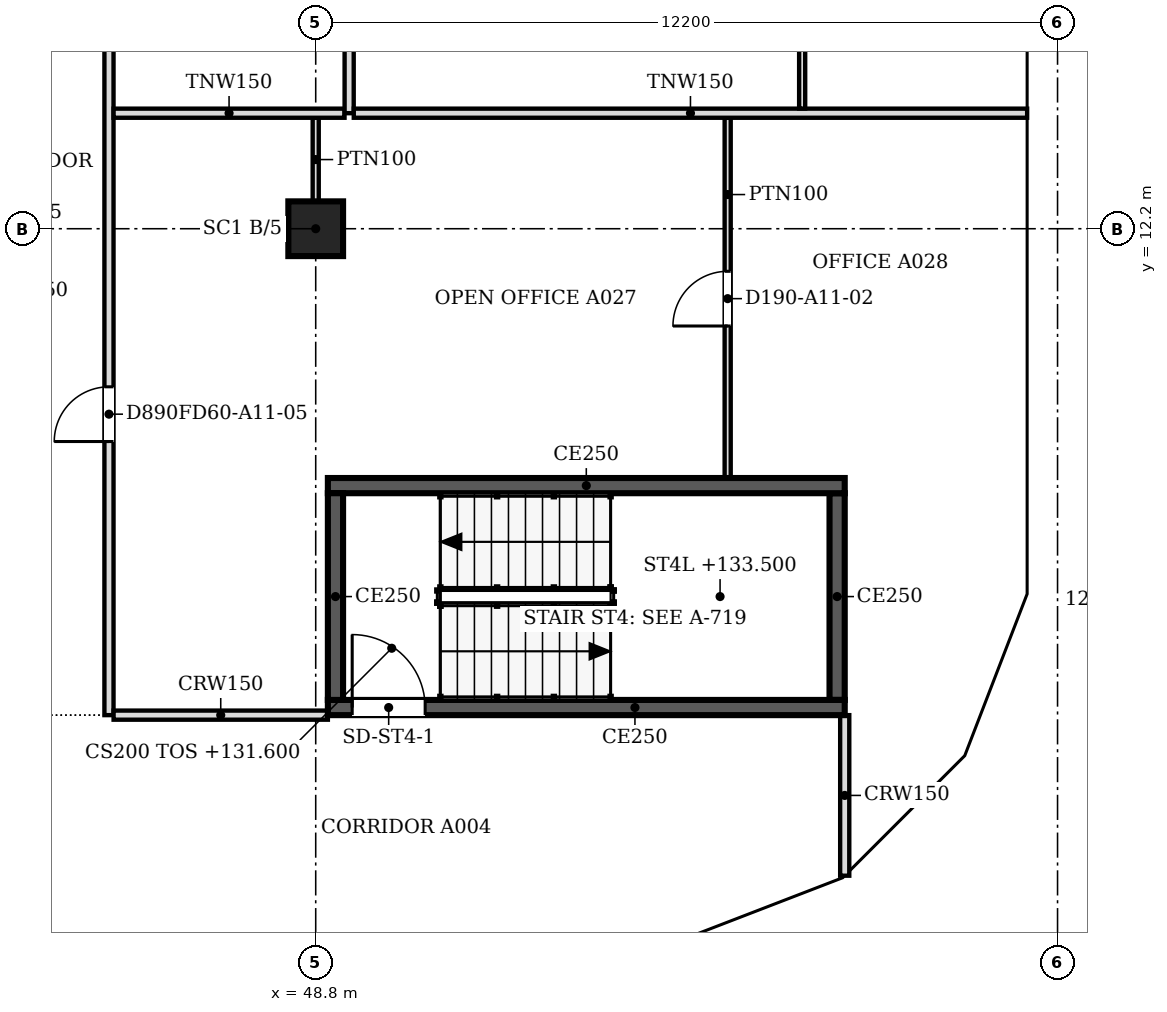
"""IFC4 building model, lengths in metres.
Left out: names, types, materials, properties, quantities, classifications, styles, units other than length and angle.
Written with IfcOpenShell. Run it as: python <this file> out.ifc"""

import sys

from ifc_helpers import new_model, si_unit, direction, frame, frame_2d, origin, origin_2d, place, context, subcontext, project, spatial, polyline, rectangle, outline, extrude, faceted_brep, source, transform, mapped, element, fill, save


model = new_model("IFC4")
c1 = context("Model", 3, precision=1e-05, world=origin(), true_north=direction((0.0, 1.0)))
c2 = subcontext(c1, "Body", "Model", "MODEL_VIEW")
j1 = project(units=[si_unit("LENGTHUNIT", "METRE"), si_unit("PLANEANGLEUNIT", "RADIAN")], contexts=[c1])
p1 = place(None, origin())
s1 = spatial("IfcSite", under=j1, at=p1, CompositionType="ELEMENT")
p2 = place(p1, origin())
s2 = spatial("IfcBuilding", under=s1, at=p2, CompositionType="ELEMENT")
p3 = place(p2, frame((0.0, 0.0, 131.6)))
s3 = spatial("IfcBuildingStorey", under=s2, at=p3, CompositionType="ELEMENT", Elevation=131.6)
p4 = place(p3, frame((48.8, 12.2, 0.0), z_axis=(0.0, 0.0, 1.0), x_axis=(1.0, 0.0, 0.0)))
e1 = element("IfcColumn", 1, at=p4, inside=s3, PredefinedType="COLUMN", context=c2, shape_type="SweptSolid", body=[
    extrude(rectangle(XDim=0.9, YDim=0.9, at=origin_2d()), origin(), (0.0, 0.0, 1.0), 3.6),
])
m1 = source(origin(), c2, "Body", "Brep", [
    faceted_brep([(2.95, -0.25, 0.0), (3.003, -0.25, 0.068), (3.003, -0.25, 7.531), (2.95, -0.25, 7.6), (0.0, -0.25, 3.8), (0.047, 0.25, 3.86), (2.898, 0.25, 7.532), (2.898, 0.25, 0.068), (0.047, 0.25, 3.74), (2.95, 0.0, 0.0), (2.95, 0.0, 7.6), (0.0, 0.0, 3.8)], [[[0, 1, 2, 3, 4]], [[5, 6, 7, 8]], [[1, 0, 9]], [[10, 3, 2]], [[6, 5, 11, 4, 3, 10]], [[8, 7, 9, 0, 4, 11]], [[8, 11, 5]], [[1, 9, 7, 6, 10, 2]]]),
])
p5 = place(p3, frame((54.854, 0.25, -3.8), z_axis=(0.0, 0.0, 1.0), x_axis=(0.932970071518, 0.359953949349, 0.0)))
e2 = element("IfcWall", 2, at=p5, inside=s3, PredefinedType="SOLIDWALL", context=c2, shape_type="MappedRepresentation", body=[
    mapped(m1, transform((0.0, 0.0, 0.0), scale=1.0)),
])
m2 = source(origin(), c2, "Body", "SweptSolid", [
    extrude(outline(polyline([(2.75, 6.935), (0.316, 3.8), (2.75, 0.665), (2.75, 6.935)])), frame((0.0, 0.26, 0.0), z_axis=(0.0, -1.0, 0.0), x_axis=(1.0, 0.0, 0.0)), (0.0, 0.0, 1.0), 0.52),
])
p6 = place(p5, origin())
e3 = element("IfcOpeningElement", 3, at=p6, cuts=e2, PredefinedType="OPENING", context=c2, shape_type="MappedRepresentation", body=[
    mapped(m2, transform((0.0, 0.0, 0.0), scale=1.0)),
])
m3 = source(origin(), c2, "Body", "Brep", [
    faceted_brep([(0.053, -0.25, 0.0), (2.997, -0.25, 3.8), (0.053, -0.25, 7.6), (0.0, -0.25, 7.532), (0.0, -0.25, 0.068), (0.106, 0.25, 7.531), (2.944, 0.25, 3.868), (2.944, 0.25, 3.732), (0.106, 0.25, 0.068), (2.997, 0.0, 3.8), (0.053, 0.0, 0.0), (0.053, 0.0, 7.6)], [[[0, 1, 2, 3, 4]], [[5, 6, 7, 8]], [[8, 7, 9, 1, 0, 10]], [[6, 5, 11, 2, 1, 9]], [[3, 2, 11]], [[10, 0, 4]], [[8, 10, 4, 3, 11, 5]], [[7, 6, 9]]]),
])
p7 = place(p3, frame((57.569, 1.274, -3.8), z_axis=(0.0, 0.0, 1.0), x_axis=(0.707066050402, 0.707147509625, 0.0)))
e4 = element("IfcWall", 4, at=p7, inside=s3, PredefinedType="SOLIDWALL", context=c2, shape_type="MappedRepresentation", body=[
    mapped(m3, transform((0.0, 0.0, 0.0), scale=1.0)),
])
m4 = source(origin(), c2, "Body", "SweptSolid", [
    extrude(outline(polyline([(0.253, 0.666), (2.681, 3.8), (0.253, 6.934), (0.253, 0.666)])), frame((0.0, 0.26, 0.0), z_axis=(0.0, -1.0, 0.0), x_axis=(1.0, 0.0, 0.0)), (0.0, 0.0, 1.0), 0.52),
])
p8 = place(p7, origin())
e5 = element("IfcOpeningElement", 5, at=p8, cuts=e4, PredefinedType="OPENING", context=c2, shape_type="MappedRepresentation", body=[
    mapped(m4, transform((0.0, 0.0, 0.0), scale=1.0)),
])
m5 = source(origin(), c2, "Body", "Brep", [
    faceted_brep([(2.95, -0.25, 0.0), (2.997, -0.25, 0.059), (2.997, -0.25, 7.541), (2.95, -0.25, 7.6), (0.0, -0.25, 3.8), (0.053, 0.25, 3.868), (2.904, 0.25, 7.54), (2.904, 0.25, 0.06), (0.053, 0.25, 3.732), (2.95, 0.0, 0.0), (2.95, 0.0, 7.6), (0.0, 0.0, 3.8)], [[[0, 1, 2, 3, 4]], [[5, 6, 7, 8]], [[1, 0, 9]], [[10, 3, 2]], [[6, 5, 11, 4, 3, 10]], [[8, 7, 9, 0, 4, 11]], [[8, 11, 5]], [[1, 9, 7, 6, 10, 2]]]),
])
p9 = place(p3, frame((59.688, 3.394, -3.8), z_axis=(0.0, 0.0, 1.0), x_axis=(0.359972353723, 0.932962970624, 0.0)))
e6 = element("IfcWall", 6, at=p9, inside=s3, PredefinedType="SOLIDWALL", context=c2, shape_type="MappedRepresentation", body=[
    mapped(m5, transform((0.0, 0.0, 0.0), scale=1.0)),
])
p10 = place(p9, origin())
e7 = element("IfcOpeningElement", 7, at=p10, cuts=e6, PredefinedType="OPENING", context=c2, shape_type="MappedRepresentation", body=[
    mapped(m2, transform((0.0, 0.0, 0.0), scale=1.0)),
])
m6 = source(origin(), c2, "Body", "Brep", [
    faceted_brep([(0.047, -0.25, 0.0), (3.05, -0.25, 3.8), (0.047, -0.25, 7.6), (0.0, -0.25, 7.54), (0.0, -0.25, 0.06), (0.093, 0.25, 7.541), (3.05, 0.25, 3.8), (0.093, 0.25, 0.059), (0.047, 0.0, 0.0), (0.047, 0.0, 7.6)], [[[0, 1, 2, 3, 4]], [[5, 6, 7]], [[7, 6, 1, 0, 8]], [[6, 5, 9, 2, 1]], [[3, 2, 9]], [[8, 0, 4]], [[7, 8, 4, 3, 9, 5]]]),
])
p11 = place(p3, frame((60.75, 6.1, -3.8), z_axis=(0.0, 0.0, 1.0), x_axis=(0.0, 1.0, 0.0)))
e8 = element("IfcWall", 8, at=p11, inside=s3, PredefinedType="SOLIDWALL", context=c2, shape_type="MappedRepresentation", body=[
    mapped(m6, transform((0.0, 0.0, 0.0), scale=1.0)),
])
m7 = source(origin(), c2, "Body", "SweptSolid", [
    extrude(outline(polyline([(0.247, 0.656), (2.731, 3.8), (0.247, 6.944), (0.247, 0.656)])), frame((0.0, 0.26, 0.0), z_axis=(0.0, -1.0, 0.0), x_axis=(1.0, 0.0, 0.0)), (0.0, 0.0, 1.0), 0.52),
])
p12 = place(p11, origin())
e9 = element("IfcOpeningElement", 9, at=p12, cuts=e8, PredefinedType="OPENING", context=c2, shape_type="MappedRepresentation", body=[
    mapped(m7, transform((0.0, 0.0, 0.0), scale=1.0)),
])
m8 = source(origin(), c2, "Body", "SweptSolid", [
    extrude(outline(polyline([(3.05, 0.0), (6.1, 3.8), (3.05, 7.6), (0.0, 3.8), (3.05, 0.0)])), frame((0.0, 0.25, 0.0), z_axis=(0.0, -1.0, 0.0), x_axis=(1.0, 0.0, 0.0)), (0.0, 0.0, 1.0), 0.5),
])
p13 = place(p3, frame((60.75, 9.15, -3.8), z_axis=(0.0, 0.0, 1.0), x_axis=(0.0, 1.0, 0.0)))
e10 = element("IfcWall", 10, at=p13, inside=s3, PredefinedType="SOLIDWALL", context=c2, shape_type="MappedRepresentation", body=[
    mapped(m8, transform((0.0, 0.0, 0.0), scale=1.0)),
])
m9 = source(origin(), c2, "Body", "SweptSolid", [
    extrude(outline(polyline([(3.05, 0.399), (5.78, 3.8), (3.05, 7.2), (0.321, 3.8), (3.05, 0.399)])), frame((0.0, 0.26, 0.0), z_axis=(0.0, -1.0, 0.0), x_axis=(1.0, 0.0, 0.0)), (0.0, 0.0, 1.0), 0.52),
])
p14 = place(p13, origin())
e11 = element("IfcOpeningElement", 11, at=p14, cuts=e10, PredefinedType="OPENING", context=c2, shape_type="MappedRepresentation", body=[
    mapped(m9, transform((0.0, 0.0, 0.0), scale=1.0)),
])
p15 = place(p2, frame((0.0, 0.0, 135.4)))
s4 = spatial("IfcBuildingStorey", under=s2, at=p15, CompositionType="ELEMENT", Elevation=135.4)
m10 = source(origin(), c2, "Body", "Brep", [
    faceted_brep([(0.047, -0.25, 0.0), (2.997, -0.25, 3.8), (0.047, -0.25, 7.6), (0.0, -0.25, 7.541), (0.0, -0.25, 0.059), (0.093, 0.25, 7.54), (2.944, 0.25, 3.868), (2.944, 0.25, 3.732), (0.093, 0.25, 0.06), (2.997, 0.0, 3.8), (0.047, 0.0, 0.0), (0.047, 0.0, 7.6)], [[[0, 1, 2, 3, 4]], [[5, 6, 7, 8]], [[8, 7, 9, 1, 0, 10]], [[6, 5, 11, 2, 1, 9]], [[3, 2, 11]], [[10, 0, 4]], [[8, 10, 4, 3, 11, 5]], [[9, 7, 6]]]),
])
p16 = place(p15, frame((54.81, 0.233, -3.8), z_axis=(0.0, 0.0, 1.0), x_axis=(0.932990326376, 0.359901446078, 0.0)))
e12 = element("IfcWall", 12, at=p16, inside=s4, PredefinedType="SOLIDWALL", context=c2, shape_type="MappedRepresentation", body=[
    mapped(m10, transform((0.0, 0.0, 0.0), scale=1.0)),
])
m11 = source(origin(), c2, "Body", "SweptSolid", [
    extrude(outline(polyline([(0.247, 0.665), (2.681, 3.8), (0.247, 6.935), (0.247, 0.665)])), frame((0.0, 0.26, 0.0), z_axis=(0.0, -1.0, 0.0), x_axis=(1.0, 0.0, 0.0)), (0.0, 0.0, 1.0), 0.52),
])
p17 = place(p16, origin())
e13 = element("IfcOpeningElement", 13, at=p17, cuts=e12, PredefinedType="OPENING", context=c2, shape_type="MappedRepresentation", body=[
    mapped(m11, transform((0.0, 0.0, 0.0), scale=1.0)),
])
m12 = source(origin(), c2, "Body", "Brep", [
    faceted_brep([(2.944, -0.25, 0.0), (2.997, -0.25, 0.068), (2.997, -0.25, 7.532), (2.944, -0.25, 7.6), (0.0, -0.25, 3.8), (0.053, 0.25, 3.868), (2.891, 0.25, 7.532), (2.891, 0.25, 0.068), (0.053, 0.25, 3.731), (2.944, 0.0, 0.0), (2.944, 0.0, 7.6), (0.0, 0.0, 3.8)], [[[0, 1, 2, 3, 4]], [[5, 6, 7, 8]], [[1, 0, 9]], [[10, 3, 2]], [[6, 5, 11, 4, 3, 10]], [[8, 7, 9, 0, 4, 11]], [[8, 11, 5]], [[1, 9, 7, 6, 10, 2]]]),
])
p18 = place(p15, frame((57.606, 1.312, -3.8), z_axis=(0.0, 0.0, 1.0), x_axis=(0.707147509625, 0.707066050402, 0.0)))
e14 = element("IfcWall", 14, at=p18, inside=s4, PredefinedType="SOLIDWALL", context=c2, shape_type="MappedRepresentation", body=[
    mapped(m12, transform((0.0, 0.0, 0.0), scale=1.0)),
])
m13 = source(origin(), c2, "Body", "SweptSolid", [
    extrude(outline(polyline([(2.744, 6.934), (0.316, 3.8), (2.744, 0.666), (2.744, 6.934)])), frame((0.0, 0.26, 0.0), z_axis=(0.0, -1.0, 0.0), x_axis=(1.0, 0.0, 0.0)), (0.0, 0.0, 1.0), 0.52),
])
p19 = place(p18, origin())
e15 = element("IfcOpeningElement", 15, at=p19, cuts=e14, PredefinedType="OPENING", context=c2, shape_type="MappedRepresentation", body=[
    mapped(m13, transform((0.0, 0.0, 0.0), scale=1.0)),
])
m14 = source(origin(), c2, "Body", "Brep", [
    faceted_brep([(0.053, -0.25, 0.0), (3.003, -0.25, 3.8), (0.053, -0.25, 7.6), (0.0, -0.25, 7.531), (0.0, -0.25, 0.068), (0.106, 0.25, 7.532), (2.957, 0.25, 3.86), (2.957, 0.25, 3.74), (0.106, 0.25, 0.068), (3.003, 0.0, 3.8), (0.053, 0.0, 0.0), (0.053, 0.0, 7.6)], [[[0, 1, 2, 3, 4]], [[5, 6, 7, 8]], [[8, 7, 9, 1, 0, 10]], [[6, 5, 11, 2, 1, 9]], [[3, 2, 11]], [[10, 0, 4]], [[8, 10, 4, 3, 11, 5]], [[9, 7, 6]]]),
])
p20 = place(p15, frame((59.669, 3.344, -3.8), z_axis=(0.0, 0.0, 1.0), x_axis=(0.35992665181, 0.932980602862, 0.0)))
e16 = element("IfcWall", 16, at=p20, inside=s4, PredefinedType="SOLIDWALL", context=c2, shape_type="MappedRepresentation", body=[
    mapped(m14, transform((0.0, 0.0, 0.0), scale=1.0)),
])
m15 = source(origin(), c2, "Body", "SweptSolid", [
    extrude(outline(polyline([(0.253, 0.665), (2.687, 3.8), (0.253, 6.935), (0.253, 0.665)])), frame((0.0, 0.26, 0.0), z_axis=(0.0, -1.0, 0.0), x_axis=(1.0, 0.0, 0.0)), (0.0, 0.0, 1.0), 0.52),
])
p21 = place(p20, origin())
e17 = element("IfcOpeningElement", 17, at=p21, cuts=e16, PredefinedType="OPENING", context=c2, shape_type="MappedRepresentation", body=[
    mapped(m15, transform((0.0, 0.0, 0.0), scale=1.0)),
])
m16 = source(origin(), c2, "Body", "Brep", [
    faceted_brep([(3.003, -0.25, 0.0), (6.053, -0.25, 3.8), (3.003, -0.25, 7.6), (0.0, -0.25, 3.8), (0.047, 0.25, 3.859), (3.003, 0.25, 7.6), (6.053, 0.25, 3.8), (3.003, 0.25, 0.0), (0.047, 0.25, 3.741), (0.0, 0.0, 3.8)], [[[0, 1, 2, 3]], [[4, 5, 6, 7, 8]], [[7, 6, 1, 0]], [[6, 5, 2, 1]], [[5, 4, 9, 3, 2]], [[8, 7, 0, 3, 9]], [[8, 9, 4]]]),
])
p22 = place(p15, frame((60.75, 6.146, -3.8), z_axis=(0.0, 0.0, 1.0), x_axis=(0.0, 1.0, 0.0)))
e18 = element("IfcWall", 18, at=p22, inside=s4, PredefinedType="SOLIDWALL", context=c2, shape_type="MappedRepresentation", body=[
    mapped(m16, transform((0.0, 0.0, 0.0), scale=1.0)),
])
m17 = source(origin(), c2, "Body", "SweptSolid", [
    extrude(outline(polyline([(3.005, 0.401), (5.733, 3.8), (3.005, 7.199), (0.319, 3.8), (3.005, 0.401)])), frame((0.0, 0.26, 0.0), z_axis=(0.0, -1.0, 0.0), x_axis=(1.0, 0.0, 0.0)), (0.0, 0.0, 1.0), 0.52),
])
p23 = place(p22, origin())
e19 = element("IfcOpeningElement", 19, at=p23, cuts=e18, PredefinedType="OPENING", context=c2, shape_type="MappedRepresentation", body=[
    mapped(m17, transform((0.0, 0.0, 0.0), scale=1.0)),
])
m18 = source(origin(), c2, "Body", "SweptSolid", [
    extrude(outline(polyline([(3.05, 0.0), (6.1, 3.8), (3.05, 7.6), (0.0, 3.8), (3.05, 0.0)])), frame((0.0, 0.25, 0.0), z_axis=(0.0, -1.0, 0.0), x_axis=(1.0, 0.0, 0.0)), (0.0, 0.0, 1.0), 0.5),
])
p24 = place(p15, frame((60.75, 12.2, -3.8), z_axis=(0.0, 0.0, 1.0), x_axis=(0.0, 1.0, 0.0)))
e20 = element("IfcWall", 20, at=p24, inside=s4, PredefinedType="SOLIDWALL", context=c2, shape_type="MappedRepresentation", body=[
    mapped(m18, transform((0.0, 0.0, 0.0), scale=1.0)),
])
m19 = source(origin(), c2, "Body", "SweptSolid", [
    extrude(outline(polyline([(3.05, 0.399), (5.78, 3.8), (3.05, 7.2), (0.321, 3.8), (3.05, 0.399)])), frame((0.0, 0.26, 0.0), z_axis=(0.0, -1.0, 0.0), x_axis=(1.0, 0.0, 0.0)), (0.0, 0.0, 1.0), 0.52),
])
p25 = place(p24, origin())
e21 = element("IfcOpeningElement", 21, at=p25, cuts=e20, PredefinedType="OPENING", context=c2, shape_type="MappedRepresentation", body=[
    mapped(m19, transform((0.0, 0.0, 0.0), scale=1.0)),
])
p26 = place(p3, frame((57.5, 4.325, 0.0), z_axis=(0.0, 0.0, 1.0), x_axis=(-1.0, 0.0, 0.0)))
e22 = element("IfcWall", 22, at=p26, inside=s3, PredefinedType="SOLIDWALL", context=c2, shape_type="SweptSolid", body=[
    extrude(rectangle(XDim=8.5, YDim=0.25, at=frame_2d((4.25, 0.0))), origin(), (0.0, 0.0, 1.0), 3.8),
])
m20 = source(origin(), c2, "Body", "SweptSolid", [
    extrude(rectangle(XDim=1.2, YDim=2.1, at=frame_2d((0.6, 1.05))), frame((0.0, 0.135, 0.0), z_axis=(0.0, -1.0, 0.0), x_axis=(1.0, 0.0, 0.0)), (0.0, 0.0, 1.0), 0.27),
])
p27 = place(p26, frame((6.9, 0.0, 0.0)))
e23 = element("IfcOpeningElement", 23, at=p27, cuts=e22, PredefinedType="OPENING", context=c2, shape_type="MappedRepresentation", body=[
    mapped(m20, transform((0.0, 0.0, 0.0), scale=1.0)),
])
p28 = place(p3, frame((49.125, 4.45, 0.0), z_axis=(0.0, 0.0, 1.0), x_axis=(0.0, 1.0, 0.0)))
e24 = element("IfcWall", 24, at=p28, inside=s3, PredefinedType="SOLIDWALL", context=c2, shape_type="SweptSolid", body=[
    extrude(rectangle(XDim=3.4, YDim=0.25, at=frame_2d((1.7, 0.0))), origin(), (0.0, 0.0, 1.0), 3.8),
])
p29 = place(p3, frame((49.0, 7.975, 0.0), z_axis=(0.0, 0.0, 1.0), x_axis=(1.0, 0.0, 0.0)))
e25 = element("IfcWall", 25, at=p29, inside=s3, PredefinedType="SOLIDWALL", context=c2, shape_type="SweptSolid", body=[
    extrude(rectangle(XDim=8.5, YDim=0.25, at=frame_2d((4.25, 0.0))), origin(), (0.0, 0.0, 1.0), 3.8),
])
p30 = place(p3, frame((57.375, 7.85, 0.0), z_axis=(0.0, 0.0, 1.0), x_axis=(0.0, -1.0, 0.0)))
e26 = element("IfcWall", 26, at=p30, inside=s3, PredefinedType="SOLIDWALL", context=c2, shape_type="SweptSolid", body=[
    extrude(rectangle(XDim=3.4, YDim=0.25, at=frame_2d((1.7, 0.0))), origin(), (0.0, 0.0, 1.0), 3.8),
])
p31 = place(p3, frame((57.5, 1.559, 0.0), z_axis=(0.0, 0.0, 1.0), x_axis=(0.0, 1.0, 0.0)))
e27 = element("IfcWall", 27, at=p31, inside=s3, PredefinedType="PARTITIONING", context=c2, shape_type="SweptSolid", body=[
    extrude(rectangle(XDim=2.641, YDim=0.15, at=frame_2d((1.32, 0.0))), origin(), (0.0, 0.0, 1.0), 3.067),
])
p32 = place(p3, frame((45.4, 22.0, 0.0), z_axis=(0.0, 0.0, 1.0), x_axis=(0.0, -1.0, 0.0)))
e28 = element("IfcWall", 28, at=p32, inside=s3, PredefinedType="PARTITIONING", context=c2, shape_type="SweptSolid", body=[
    extrude(rectangle(XDim=17.8, YDim=0.15, at=frame_2d((8.9, 0.0))), origin(), (0.0, 0.0, 1.0), 3.067),
])
m21 = source(origin(), c2, "Body", "SweptSolid", [
    extrude(rectangle(XDim=1.0, YDim=2.1, at=frame_2d((0.5, 1.05))), frame((0.0, 0.085, 0.0), z_axis=(0.0, -1.0, 0.0), x_axis=(1.0, 0.0, 0.0)), (0.0, 0.0, 1.0), 0.17),
])
p33 = place(p32, frame((3.499, 0.0, 0.0)))
e29 = element("IfcOpeningElement", 29, at=p33, cuts=e28, PredefinedType="OPENING", context=c2, shape_type="MappedRepresentation", body=[
    mapped(m21, transform((0.0, 0.0, 0.0), scale=1.0)),
])
m22 = source(origin(), c2, "Body", "SweptSolid", [
    extrude(rectangle(XDim=0.9, YDim=2.1, at=frame_2d((0.45, 1.05))), frame((0.0, 0.085, 0.0), z_axis=(0.0, -1.0, 0.0), x_axis=(1.0, 0.0, 0.0)), (0.0, 0.0, 1.0), 0.17),
])
p34 = place(p32, frame((12.4, 0.0, 0.0)))
e30 = element("IfcOpeningElement", 30, at=p34, cuts=e28, PredefinedType="OPENING", context=c2, shape_type="MappedRepresentation", body=[
    mapped(m22, transform((0.0, 0.0, 0.0), scale=1.0)),
])
p35 = place(p3, frame((45.476, 4.2, 0.0), z_axis=(0.0, 0.0, 1.0), x_axis=(1.0, 0.0, 0.0)))
e31 = element("IfcWall", 31, at=p35, inside=s3, PredefinedType="PARTITIONING", context=c2, shape_type="SweptSolid", body=[
    extrude(rectangle(XDim=3.524, YDim=0.15, at=frame_2d((1.762, 0.0))), origin(), (0.0, 0.0, 1.0), 3.067),
])
p36 = place(p3, frame((55.575, 14.024, 0.0), z_axis=(0.0, 0.0, 1.0), x_axis=(0.0, -1.0, 0.0)))
e32 = element("IfcWall", 32, at=p36, inside=s3, PredefinedType="PARTITIONING", context=c2, shape_type="SweptSolid", body=[
    extrude(rectangle(XDim=5.924, YDim=0.1, at=frame_2d((2.962, 0.0))), origin(), (0.0, 0.0, 1.0), 3.067),
])
m23 = source(origin(), c2, "Body", "SweptSolid", [
    extrude(rectangle(XDim=0.9, YDim=2.1, at=frame_2d((0.45, 1.05))), frame((0.0, 0.06, 0.0), z_axis=(0.0, -1.0, 0.0), x_axis=(1.0, 0.0, 0.0)), (0.0, 0.0, 1.0), 0.12),
])
p37 = place(p36, frame((2.524, 0.0, 0.0)))
e33 = element("IfcOpeningElement", 33, at=p37, cuts=e32, PredefinedType="OPENING", context=c2, shape_type="MappedRepresentation", body=[
    mapped(m23, transform((0.0, 0.0, 0.0), scale=1.0)),
])
p38 = place(p3, frame((48.8, 12.65, 0.0), z_axis=(0.0, 0.0, 1.0), x_axis=(0.0, 1.0, 0.0)))
e34 = element("IfcWall", 34, at=p38, inside=s3, PredefinedType="PARTITIONING", context=c2, shape_type="SweptSolid", body=[
    extrude(rectangle(XDim=1.375, YDim=0.1, at=frame_2d((0.688, 0.0))), origin(), (0.0, 0.0, 1.0), 3.067),
])
p39 = place(p3, frame((45.476, 14.1, 0.0), z_axis=(0.0, 0.0, 1.0), x_axis=(1.0, 0.0, 0.0)))
e35 = element("IfcWall", 35, at=p39, inside=s3, PredefinedType="PARTITIONING", context=c2, shape_type="SweptSolid", body=[
    extrude(rectangle(XDim=3.798, YDim=0.15, at=frame_2d((1.899, 0.0))), origin(), (0.0, 0.0, 1.0), 3.067),
])
p40 = place(p3, frame((49.35, 21.924, 0.0), z_axis=(0.0, 0.0, 1.0), x_axis=(0.0, -1.0, 0.0)))
e36 = element("IfcWall", 36, at=p40, inside=s3, PredefinedType="PARTITIONING", context=c2, shape_type="SweptSolid", body=[
    extrude(rectangle(XDim=7.824, YDim=0.15, at=frame_2d((3.912, 0.0))), origin(), (0.0, 0.0, 1.0), 3.067),
])
p41 = place(p40, frame((3.424, 0.0, 0.0)))
e37 = element("IfcOpeningElement", 37, at=p41, cuts=e36, PredefinedType="OPENING", context=c2, shape_type="MappedRepresentation", body=[
    mapped(m22, transform((0.0, 0.0, 0.0), scale=1.0)),
])
p42 = place(p3, frame((49.426, 14.1, 0.0), z_axis=(0.0, 0.0, 1.0), x_axis=(1.0, 0.0, 0.0)))
e38 = element("IfcWall", 38, at=p42, inside=s3, PredefinedType="PARTITIONING", context=c2, shape_type="SweptSolid", body=[
    extrude(rectangle(XDim=11.074, YDim=0.15, at=frame_2d((5.537, 0.0))), origin(), (0.0, 0.0, 1.0), 3.067),
])
p43 = place(p3, frame((56.8, 21.924, 0.0), z_axis=(0.0, 0.0, 1.0), x_axis=(0.0, -1.0, 0.0)))
e39 = element("IfcWall", 39, at=p43, inside=s3, PredefinedType="PARTITIONING", context=c2, shape_type="SweptSolid", body=[
    extrude(rectangle(XDim=7.748, YDim=0.1, at=frame_2d((3.874, 0.0))), origin(), (0.0, 0.0, 1.0), 3.067),
])
p44 = place(p43, frame((3.448, 0.0, 0.0)))
e40 = element("IfcOpeningElement", 40, at=p44, cuts=e39, PredefinedType="OPENING", context=c2, shape_type="MappedRepresentation", body=[
    mapped(m23, transform((0.0, 0.0, 0.0), scale=1.0)),
])
m24 = source(origin(), c2, "Body", "SweptSolid", [
    extrude(rectangle(XDim=1.2, YDim=2.1, at=frame_2d((0.6, 1.05))), frame((0.0, 0.025, 0.0), z_axis=(0.0, -1.0, 0.0), x_axis=(1.0, 0.0, 0.0)), (0.0, 0.0, 1.0), 0.05),
])
p45 = place(p27, origin())
e41 = element("IfcDoor", 41, at=p45, inside=s3, OperationType="SINGLE_SWING_RIGHT", PredefinedType="DOOR", context=c2, shape_type="MappedRepresentation", body=[
    mapped(m24, transform((0.0, 0.0, 0.0), scale=1.0)),
])
fill(e23, e41)
m25 = source(origin(), c2, "Body", "SweptSolid", [
    extrude(rectangle(XDim=0.9, YDim=2.1, at=frame_2d((0.45, 1.05))), frame((0.0, 0.025, 0.0), z_axis=(0.0, -1.0, 0.0), x_axis=(1.0, 0.0, 0.0)), (0.0, 0.0, 1.0), 0.05),
])
p46 = place(p37, origin())
e42 = element("IfcDoor", 42, at=p46, inside=s3, OperationType="SINGLE_SWING_RIGHT", PredefinedType="DOOR", context=c2, shape_type="MappedRepresentation", body=[
    mapped(m25, transform((0.0, 0.0, 0.0), scale=1.0)),
])
fill(e33, e42)
p47 = place(p34, origin())
e43 = element("IfcDoor", 43, at=p47, inside=s3, OperationType="SINGLE_SWING_RIGHT", PredefinedType="DOOR", context=c2, shape_type="MappedRepresentation", body=[
    mapped(m25, transform((0.0, 0.0, 0.0), scale=1.0)),
])
fill(e30, e43)
save(model, sys.argv[1])
